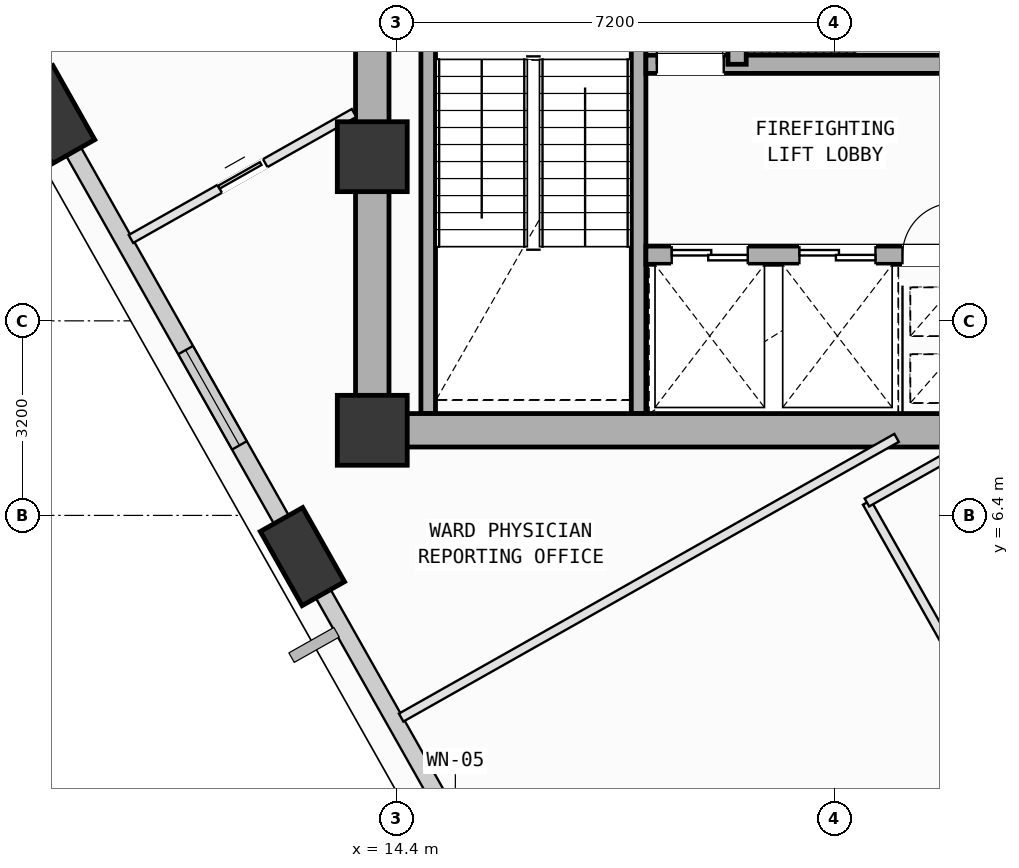
"""IFC4 building model, lengths in metres.
Left out: names, types, materials, properties, quantities, classifications, styles, units other than length and angle.
Written with IfcOpenShell. Run it as: python <this file> out.ifc"""

import sys

from ifc_helpers import new_model, si_unit, direction, frame, frame_2d, origin, origin_2d, place, context, subcontext, project, spatial, rectangle, extrude, element, fill, save


model = new_model("IFC4")
c1 = context("Model", 3, precision=1e-05, world=origin(), true_north=direction((0.0, 1.0)))
c2 = subcontext(c1, "Body", "Model", "MODEL_VIEW")
j1 = project(units=[si_unit("LENGTHUNIT", "METRE"), si_unit("PLANEANGLEUNIT", "RADIAN")], contexts=[c1])
p1 = place(None, origin())
s1 = spatial("IfcSite", under=j1, at=p1, CompositionType="ELEMENT")
p2 = place(p1, origin())
s2 = spatial("IfcBuilding", under=s1, at=p2, CompositionType="ELEMENT")
p3 = place(p2, frame((0.0, 0.0, 149.8)))
s3 = spatial("IfcBuildingStorey", under=s2, at=p3, CompositionType="ELEMENT", Elevation=149.8)
for number, where, z_axis, x_axis in (
    (1, (14.0, 7.8, 0.0), (0.0, 0.0, 1.0), (1.0, 0.0, 0.0)),
    (2, (14.0, 12.3, 0.0), (0.0, 0.0, 1.0), (1.0, 0.0, 0.0)),
):
    element("IfcColumn", number, at=place(p3, frame(where, z_axis=z_axis, x_axis=x_axis)), inside=s3, PredefinedType="COLUMN", context=c2, shape_type="SweptSolid", body=[
        extrude(rectangle(XDim=1.15, YDim=1.15, at=origin_2d()), origin(), (0.0, 0.0, 1.0), 4.0),
    ])
p4 = place(p3, frame((8.743, 12.992, 0.094), z_axis=(0.04945429726, -0.101952891713, 0.993559198213), x_axis=(-0.819960830844, 0.563851045212, 0.098672360339)))
e3 = element("IfcColumn", 3, at=p4, inside=s3, PredefinedType="COLUMN", context=c2, shape_type="SweptSolid", body=[
    extrude(rectangle(XDim=1.4, YDim=0.8, at=origin_2d()), origin(), (0.0, 0.0, 1.0), 3.93),
])
p5 = place(p3, frame((12.851, 5.723, 0.096), z_axis=(0.079171283237, -0.084826374897, 0.993245384602), x_axis=(-0.949572727116, 0.296820875831, 0.101039613956)))
e4 = element("IfcColumn", 4, at=p5, inside=s3, PredefinedType="COLUMN", context=c2, shape_type="SweptSolid", body=[
    extrude(rectangle(XDim=1.4, YDim=0.8, at=origin_2d()), origin(), (0.0, 0.0, 1.0), 3.929),
])
p6 = place(p3, frame((12.713, 5.962, 0.0), z_axis=(0.0, 0.0, 1.0), x_axis=(-0.491677941707, 0.870777125123, 0.0)))
e5 = element("IfcWall", 5, at=p6, inside=s3, PredefinedType="SOLIDWALL", context=c2, shape_type="SweptSolid", body=[
    extrude(rectangle(XDim=7.36, YDim=0.28, at=frame_2d((3.68, 0.0))), origin(), (0.0, 0.0, 1.0), 3.165),
])
p7 = place(p6, frame((1.825, 0.0, 0.75)))
e6 = element("IfcOpeningElement", 6, at=p7, cuts=e5, PredefinedType="OPENING", context=c2, shape_type="SweptSolid", body=[
    extrude(rectangle(XDim=1.8, YDim=2.05, at=frame_2d((0.9, 1.025))), frame((0.0, 0.15, 0.0), z_axis=(0.0, -1.0, 0.0), x_axis=(1.0, 0.0, 0.0)), (0.0, 0.0, 1.0), 0.3),
])
p8 = place(p3, frame((16.258, -0.316, 0.0), z_axis=(0.0, 0.0, 1.0), x_axis=(-0.491650025139, 0.87079288742, 0.0)))
e7 = element("IfcWall", 7, at=p8, inside=s3, PredefinedType="SOLIDWALL", context=c2, shape_type="SweptSolid", body=[
    extrude(rectangle(XDim=6.224, YDim=0.28, at=frame_2d((3.112, 0.0))), origin(), (0.0, 0.0, 1.0), 3.165),
])
p9 = place(p8, frame((1.213, 0.0, 0.75)))
e8 = element("IfcOpeningElement", 8, at=p9, cuts=e7, PredefinedType="OPENING", context=c2, shape_type="SweptSolid", body=[
    extrude(rectangle(XDim=1.2, YDim=1.75, at=frame_2d((0.6, 0.875))), frame((0.0, 0.15, 0.0), z_axis=(0.0, -1.0, 0.0), x_axis=(1.0, 0.0, 0.0)), (0.0, 0.0, 1.0), 0.3),
])
for number, where, z_axis, x_axis in (
    (9, (18.38, 15.12, 0.0), (0.0, 0.0, 1.0), (0.0, -1.0, 0.0)),
    (10, (14.92, 8.075, 0.0), (0.0, 0.0, 1.0), (0.0, 1.0, 0.0)),
):
    element("IfcWall", number, at=place(p3, frame(where, z_axis=z_axis, x_axis=x_axis)), inside=s3, PredefinedType="SOLIDWALL", context=c2, shape_type="SweptSolid", body=[
        extrude(rectangle(XDim=7.045, YDim=0.24, at=frame_2d((3.522, 0.0))), origin(), (0.0, 0.0, 1.0), 3.78),
    ])
p10 = place(p3, frame((14.0, 7.8, 0.0), z_axis=(0.0, 0.0, 1.0), x_axis=(1.0, 0.0, 0.0)))
e11 = element("IfcWall", 11, at=p10, inside=s3, PredefinedType="SHEAR", context=c2, shape_type="SweptSolid", body=[
    extrude(rectangle(XDim=10.8, YDim=0.55, at=frame_2d((5.4, 0.0))), origin(), (0.0, 0.0, 1.0), 3.78),
])
p11 = place(p3, frame((14.0, 16.8, 0.0), z_axis=(0.0, 0.0, 1.0), x_axis=(0.0, -1.0, 0.0)))
e12 = element("IfcWall", 12, at=p11, inside=s3, PredefinedType="SHEAR", context=c2, shape_type="SweptSolid", body=[
    extrude(rectangle(XDim=9.0, YDim=0.55, at=frame_2d((4.5, 0.0))), origin(), (0.0, 0.0, 1.0), 3.78),
])
p12 = place(p3, frame((18.5, 10.68, 0.0), z_axis=(0.0, 0.0, 1.0), x_axis=(1.0, 0.0, 0.0)))
e13 = element("IfcWall", 13, at=p12, inside=s3, PredefinedType="SOLIDWALL", context=c2, shape_type="SweptSolid", body=[
    extrude(rectangle(XDim=5.3, YDim=0.3, at=frame_2d((2.65, 0.0))), origin(), (0.0, 0.0, 1.0), 3.78),
])
p13 = place(p12, frame((4.22, 0.0, 0.0)))
e14 = element("IfcOpeningElement", 14, at=p13, cuts=e13, PredefinedType="OPENING", context=c2, shape_type="SweptSolid", body=[
    extrude(rectangle(XDim=0.86, YDim=2.06, at=frame_2d((0.43, 1.03))), frame((0.0, 0.16, 0.0), z_axis=(0.0, -1.0, 0.0), x_axis=(1.0, 0.0, 0.0)), (0.0, 0.0, 1.0), 0.32),
])
p14 = place(p12, frame((0.425, 0.0, 0.0)))
e15 = element("IfcOpeningElement", 15, at=p14, cuts=e13, PredefinedType="OPENING", context=c2, shape_type="SweptSolid", body=[
    extrude(rectangle(XDim=1.25, YDim=2.18, at=frame_2d((0.625, 1.09))), frame((0.0, 0.16, 0.0), z_axis=(0.0, -1.0, 0.0), x_axis=(1.0, 0.0, 0.0)), (0.0, 0.0, 1.0), 0.32),
])
p15 = place(p12, frame((2.525, 0.0, 0.0)))
e16 = element("IfcOpeningElement", 16, at=p15, cuts=e13, PredefinedType="OPENING", context=c2, shape_type="SweptSolid", body=[
    extrude(rectangle(XDim=1.25, YDim=2.18, at=frame_2d((0.625, 1.09))), frame((0.0, 0.16, 0.0), z_axis=(0.0, -1.0, 0.0), x_axis=(1.0, 0.0, 0.0)), (0.0, 0.0, 1.0), 0.32),
])
p16 = place(p3, frame((18.5, 13.82, 0.0), z_axis=(0.0, 0.0, 1.0), x_axis=(1.0, 0.0, 0.0)))
e17 = element("IfcWall", 17, at=p16, inside=s3, PredefinedType="SOLIDWALL", context=c2, shape_type="SweptSolid", body=[
    extrude(rectangle(XDim=5.3, YDim=0.3, at=frame_2d((2.65, 0.0))), origin(), (0.0, 0.0, 1.0), 3.78),
])
p17 = place(p16, frame((0.18, 0.0, 0.0)))
e18 = element("IfcOpeningElement", 18, at=p17, cuts=e17, PredefinedType="OPENING", context=c2, shape_type="SweptSolid", body=[
    extrude(rectangle(XDim=1.1, YDim=2.15, at=frame_2d((0.55, 1.075))), frame((0.0, 0.16, 0.0), z_axis=(0.0, -1.0, 0.0), x_axis=(1.0, 0.0, 0.0)), (0.0, 0.0, 1.0), 0.32),
])
p18 = place(p3, frame((20.0, 13.82, 0.0), z_axis=(0.0, 0.0, 1.0), x_axis=(0.0, 1.0, 0.0)))
e19 = element("IfcWall", 19, at=p18, inside=s3, PredefinedType="SOLIDWALL", context=c2, shape_type="SweptSolid", body=[
    extrude(rectangle(XDim=2.73, YDim=0.3, at=frame_2d((1.365, 0.0))), origin(), (0.0, 0.0, 1.0), 3.78),
])
p19 = place(p3, frame((28.173, -4.08, 0.0), z_axis=(0.0, 0.0, 1.0), x_axis=(-0.491696252215, 0.870766785976, 0.0)))
e20 = element("IfcWall", 20, at=p19, inside=s3, PredefinedType="PARTITIONING", context=c2, shape_type="SweptSolid", body=[
    extrude(rectangle(XDim=12.28, YDim=0.15, at=frame_2d((6.14, 0.0))), origin(), (0.0, 0.0, 1.0), 3.78),
])
p20 = place(p3, frame((22.135, 6.613, 0.0), z_axis=(0.0, 0.0, 1.0), x_axis=(0.870804799459, 0.491628926366, 0.0)))
e21 = element("IfcWall", 21, at=p20, inside=s3, PredefinedType="PARTITIONING", context=c2, shape_type="SweptSolid", body=[
    extrude(rectangle(XDim=2.16, YDim=0.15, at=frame_2d((1.08, 0.0))), origin(), (0.0, 0.0, 1.0), 3.78),
])
p21 = place(p3, frame((22.623, 7.675, 0.0), z_axis=(0.0, 0.0, 1.0), x_axis=(-0.870803770124, -0.491630749586, 0.0)))
e22 = element("IfcWall", 22, at=p21, inside=s3, PredefinedType="PARTITIONING", context=c2, shape_type="SweptSolid", body=[
    extrude(rectangle(XDim=9.357, YDim=0.15, at=frame_2d((4.678, 0.0))), origin(), (0.0, 0.0, 1.0), 3.78),
])
p22 = place(p3, frame((12.997, 4.991, 0.0), z_axis=(0.0, 0.0, 1.0), x_axis=(-0.492106220765, 0.870535161544, 0.0)))
e23 = element("IfcWall", 23, at=p22, inside=s3, PredefinedType="PARTITIONING", context=c2, shape_type="SweptSolid", body=[
    extrude(rectangle(XDim=0.986, YDim=0.15, at=frame_2d((0.493, 0.0))), origin(), (0.0, 0.0, 1.0), 3.165),
])
p23 = place(p3, frame((10.031, 10.947, 0.0), z_axis=(0.0, 0.0, 1.0), x_axis=(0.870738681616, 0.491746020154, 0.0)))
e24 = element("IfcWall", 24, at=p23, inside=s3, PredefinedType="PARTITIONING", context=c2, shape_type="SweptSolid", body=[
    extrude(rectangle(XDim=4.214, YDim=0.15, at=frame_2d((2.107, 0.0))), origin(), (0.0, 0.0, 1.0), 3.78),
])
p24 = place(p23, frame((1.677, 0.0, 0.0)))
e25 = element("IfcOpeningElement", 25, at=p24, cuts=e24, PredefinedType="OPENING", context=c2, shape_type="SweptSolid", body=[
    extrude(rectangle(XDim=0.86, YDim=2.06, at=frame_2d((0.43, 1.03))), frame((0.0, 0.085, 0.0), z_axis=(0.0, -1.0, 0.0), x_axis=(1.0, 0.0, 0.0)), (0.0, 0.0, 1.0), 0.17),
])
p25 = place(p3, frame((8.894, 12.259, 0.0), z_axis=(0.0, 0.0, 1.0), x_axis=(-0.491814027266, 0.870700271382, 0.0)))
e26 = element("IfcWall", 26, at=p25, inside=s3, PredefinedType="PARTITIONING", context=c2, shape_type="SweptSolid", body=[
    extrude(rectangle(XDim=0.992, YDim=0.15, at=frame_2d((0.496, 0.0))), origin(), (0.0, 0.0, 1.0), 3.165),
])
p26 = place(p7, origin())
e27 = element("IfcWindow", 27, at=p26, inside=s3, PartitioningType="SINGLE_PANEL", PredefinedType="WINDOW", context=c2, shape_type="SweptSolid", body=[
    extrude(rectangle(XDim=1.8, YDim=2.05, at=frame_2d((0.9, 1.025))), frame((0.0, 0.03, 0.0), z_axis=(0.0, -1.0, 0.0), x_axis=(1.0, 0.0, 0.0)), (0.0, 0.0, 1.0), 0.06),
])
fill(e6, e27)
p27 = place(p13, origin())
e28 = element("IfcDoor", 28, at=p27, inside=s3, OperationType="SINGLE_SWING_RIGHT", PredefinedType="DOOR", context=c2, shape_type="SweptSolid", body=[
    extrude(rectangle(XDim=0.86, YDim=2.06, at=frame_2d((0.43, 1.03))), frame((0.0, 0.025, 0.0), z_axis=(0.0, -1.0, 0.0), x_axis=(1.0, 0.0, 0.0)), (0.0, 0.0, 1.0), 0.05),
])
fill(e14, e28)
p28 = place(p17, origin())
e29 = element("IfcDoor", 29, at=p28, inside=s3, OperationType="SINGLE_SWING_LEFT", PredefinedType="DOOR", context=c2, shape_type="SweptSolid", body=[
    extrude(rectangle(XDim=1.1, YDim=2.15, at=frame_2d((0.55, 1.075))), frame((0.0, 0.025, 0.0), z_axis=(0.0, -1.0, 0.0), x_axis=(1.0, 0.0, 0.0)), (0.0, 0.0, 1.0), 0.05),
])
fill(e18, e29)
p29 = place(p14, origin())
e30 = element("IfcDoor", 30, at=p29, inside=s3, OperationType="DOUBLE_DOOR_SLIDING", PredefinedType="DOOR", context=c2, shape_type="SweptSolid", body=[
    extrude(rectangle(XDim=1.25, YDim=2.18, at=frame_2d((0.625, 1.09))), frame((0.0, 0.025, 0.0), z_axis=(0.0, -1.0, 0.0), x_axis=(1.0, 0.0, 0.0)), (0.0, 0.0, 1.0), 0.05),
])
fill(e15, e30)
p30 = place(p15, origin())
e31 = element("IfcDoor", 31, at=p30, inside=s3, OperationType="DOUBLE_DOOR_SLIDING", PredefinedType="DOOR", context=c2, shape_type="SweptSolid", body=[
    extrude(rectangle(XDim=1.25, YDim=2.18, at=frame_2d((0.625, 1.09))), frame((0.0, 0.025, 0.0), z_axis=(0.0, -1.0, 0.0), x_axis=(1.0, 0.0, 0.0)), (0.0, 0.0, 1.0), 0.05),
])
fill(e16, e31)
p31 = place(p24, origin())
e32 = element("IfcDoor", 32, at=p31, inside=s3, OperationType="SLIDING_TO_LEFT", PredefinedType="DOOR", context=c2, shape_type="SweptSolid", body=[
    extrude(rectangle(XDim=0.86, YDim=2.06, at=frame_2d((0.43, 1.03))), frame((0.0, 0.025, 0.0), z_axis=(0.0, -1.0, 0.0), x_axis=(1.0, 0.0, 0.0)), (0.0, 0.0, 1.0), 0.05),
])
fill(e25, e32)
save(model, sys.argv[1])
